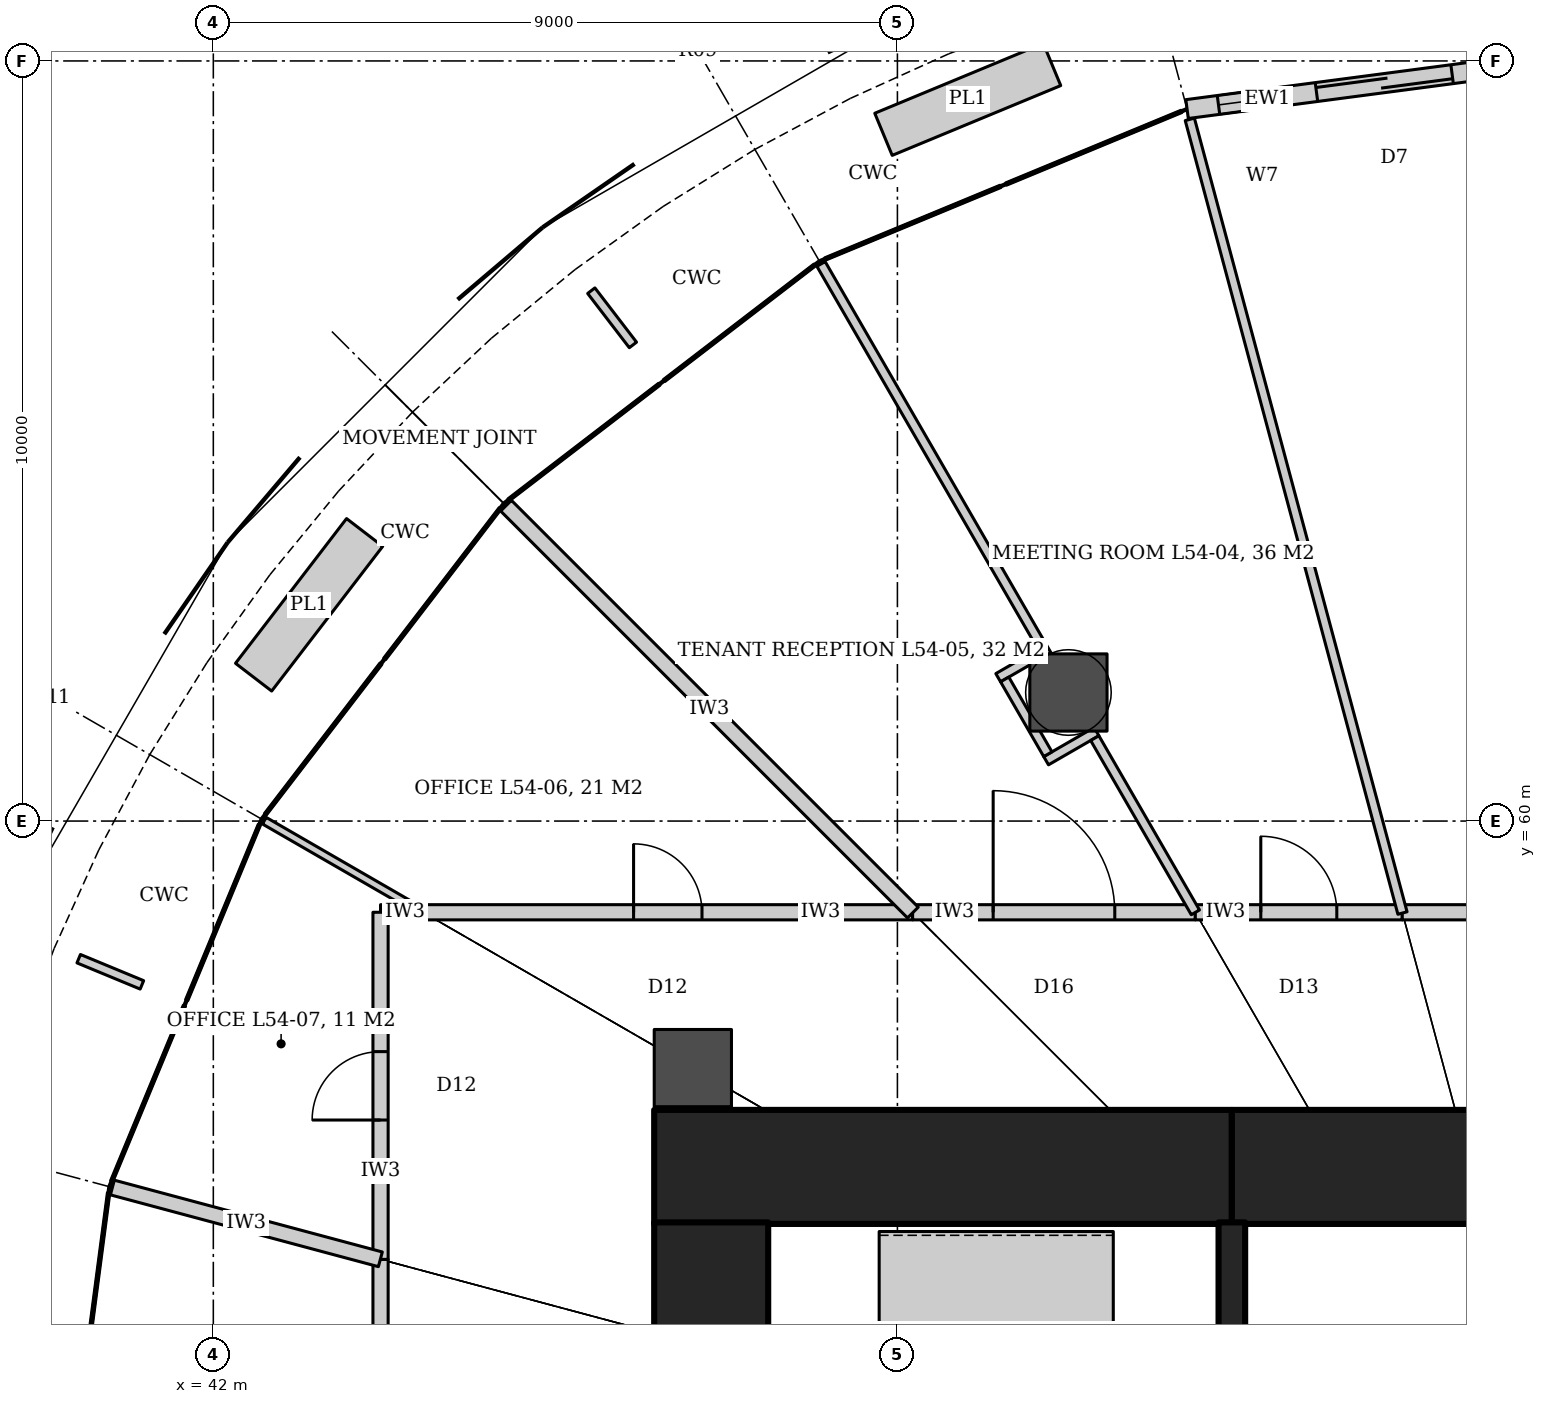
"""IFC4 building model, lengths in metres.
Left out: names, types, materials, properties, quantities, classifications, styles, units other than length and angle.
Written with IfcOpenShell. Run it as: python <this file> out.ifc"""

import sys

from ifc_helpers import new_model, si_unit, direction, frame, frame_2d, origin, origin_2d, place, context, subcontext, project, spatial, rectangle, hollow_circle, extrude, element, fill, save


model = new_model("IFC4")
c1 = context("Model", 3, precision=1e-05, world=origin(), true_north=direction((0.0, 1.0)))
c2 = subcontext(c1, "Body", "Model", "MODEL_VIEW")
j1 = project(units=[si_unit("LENGTHUNIT", "METRE"), si_unit("PLANEANGLEUNIT", "RADIAN")], contexts=[c1])
p1 = place(None, origin())
s1 = spatial("IfcSite", under=j1, at=p1, CompositionType="ELEMENT")
p2 = place(p1, origin())
s2 = spatial("IfcBuilding", under=s1, at=p2, CompositionType="ELEMENT")
p3 = place(p2, frame((0.0, 0.0, 227.6)))
s3 = spatial("IfcBuildingStorey", under=s2, at=p3, CompositionType="ELEMENT", Elevation=227.6)
p4 = place(p3, frame((47.8, 55.45, 0.0), z_axis=(0.0, 0.0, 1.0), x_axis=(1.0, 0.0, 0.0)))
e1 = element("IfcWall", 1, at=p4, inside=s3, PredefinedType="SHEAR", context=c2, shape_type="SweptSolid", body=[
    extrude(rectangle(XDim=7.6, YDim=1.5, at=frame_2d((3.8, 0.0))), origin(), (0.0, 0.0, 1.0), 4.2),
])
p5 = place(p3, frame((55.4, 55.45, 0.0), z_axis=(0.0, 0.0, 1.0), x_axis=(1.0, 0.0, 0.0)))
e2 = element("IfcWall", 2, at=p5, inside=s3, PredefinedType="SHEAR", context=c2, shape_type="SweptSolid", body=[
    extrude(rectangle(XDim=9.2, YDim=1.5, at=frame_2d((4.6, 0.0))), origin(), (0.0, 0.0, 1.0), 4.2),
])
p6 = place(p3, frame((48.55, 51.5, 0.0), z_axis=(0.0, 0.0, 1.0), x_axis=(0.0, 1.0, 0.0)))
e3 = element("IfcWall", 3, at=p6, inside=s3, PredefinedType="SHEAR", context=c2, shape_type="SweptSolid", body=[
    extrude(rectangle(XDim=3.22, YDim=1.5, at=frame_2d((1.61, 0.0))), origin(), (0.0, 0.0, 1.0), 4.2),
])
p7 = place(p3, frame((55.4, 51.655, 0.0), z_axis=(0.0, 0.0, 1.0), x_axis=(0.0, 1.0, 0.0)))
e4 = element("IfcWall", 4, at=p7, inside=s3, PredefinedType="SHEAR", context=c2, shape_type="SweptSolid", body=[
    extrude(rectangle(XDim=3.065, YDim=0.35, at=frame_2d((1.532, 0.0))), origin(), (0.0, 0.0, 1.0), 4.2),
])
for number, where, z_axis, x_axis in (
    (5, (53.25, 61.691, 0.0), (0.0, 0.0, 1.0), (1.0, 0.0, 0.0)),
    (6, (48.309, 56.75, 0.0), (0.0, 0.0, 1.0), (1.0, 0.0, 0.0)),
):
    element("IfcColumn", number, at=place(p3, frame(where, z_axis=z_axis, x_axis=x_axis)), inside=s3, PredefinedType="COLUMN", context=c2, shape_type="SweptSolid", body=[
        extrude(hollow_circle(Radius=0.508, WallThickness=0.05, at=origin_2d()), origin(), (0.0, 0.0, 1.0), 4.2),
    ])
p8 = place(p3, frame((44.2, 58.8, 0.0), z_axis=(0.0, 0.0, 1.0), x_axis=(1.0, 0.0, 0.0)))
e7 = element("IfcWall", 7, at=p8, inside=s3, PredefinedType="PARTITIONING", context=c2, shape_type="SweptSolid", body=[
    extrude(rectangle(XDim=0.558, YDim=0.2, at=frame_2d((0.279, 0.0))), origin(), (0.0, 0.0, 1.0), 3.02),
])
p9 = place(p3, frame((44.758, 58.8, 0.0), z_axis=(0.0, 0.0, 1.0), x_axis=(1.0, 0.0, 0.0)))
e8 = element("IfcWall", 8, at=p9, inside=s3, PredefinedType="PARTITIONING", context=c2, shape_type="SweptSolid", body=[
    extrude(rectangle(XDim=6.442, YDim=0.2, at=frame_2d((3.221, 0.0))), origin(), (0.0, 0.0, 1.0), 3.02),
])
p10 = place(p9, frame((2.771, 0.0, 0.0)))
e9 = element("IfcOpeningElement", 9, at=p10, cuts=e8, PredefinedType="OPENING", context=c2, shape_type="SweptSolid", body=[
    extrude(rectangle(XDim=0.9, YDim=2.4, at=frame_2d((0.45, 1.2))), frame((0.0, 0.11, 0.0), z_axis=(0.0, -1.0, 0.0), x_axis=(1.0, 0.0, 0.0)), (0.0, 0.0, 1.0), 0.22),
])
p11 = place(p3, frame((51.2, 58.8, 0.0), z_axis=(0.0, 0.0, 1.0), x_axis=(1.0, 0.0, 0.0)))
e10 = element("IfcWall", 10, at=p11, inside=s3, PredefinedType="PARTITIONING", context=c2, shape_type="SweptSolid", body=[
    extrude(rectangle(XDim=3.719, YDim=0.2, at=frame_2d((1.86, 0.0))), origin(), (0.0, 0.0, 1.0), 3.04),
])
p12 = place(p11, frame((1.06, 0.0, 0.0)))
e11 = element("IfcOpeningElement", 11, at=p12, cuts=e10, PredefinedType="OPENING", context=c2, shape_type="SweptSolid", body=[
    extrude(rectangle(XDim=1.6, YDim=2.4, at=frame_2d((0.8, 1.2))), frame((0.0, 0.11, 0.0), z_axis=(0.0, -1.0, 0.0), x_axis=(1.0, 0.0, 0.0)), (0.0, 0.0, 1.0), 0.22),
])
p13 = place(p3, frame((54.919, 58.8, 0.0), z_axis=(0.0, 0.0, 1.0), x_axis=(1.0, 0.0, 0.0)))
e12 = element("IfcWall", 12, at=p13, inside=s3, PredefinedType="PARTITIONING", context=c2, shape_type="SweptSolid", body=[
    extrude(rectangle(XDim=2.723, YDim=0.2, at=frame_2d((1.361, 0.0))), origin(), (0.0, 0.0, 1.0), 3.04),
])
p14 = place(p13, frame((0.861, 0.0, 0.0)))
e13 = element("IfcOpeningElement", 13, at=p14, cuts=e12, PredefinedType="OPENING", context=c2, shape_type="SweptSolid", body=[
    extrude(rectangle(XDim=1.0, YDim=2.4, at=frame_2d((0.5, 1.2))), frame((0.0, 0.11, 0.0), z_axis=(0.0, -1.0, 0.0), x_axis=(1.0, 0.0, 0.0)), (0.0, 0.0, 1.0), 0.22),
])
p15 = place(p3, frame((57.642, 58.8, 0.0), z_axis=(0.0, 0.0, 1.0), x_axis=(1.0, 0.0, 0.0)))
e14 = element("IfcWall", 14, at=p15, inside=s3, PredefinedType="PARTITIONING", context=c2, shape_type="SweptSolid", body=[
    extrude(rectangle(XDim=18.158, YDim=0.2, at=frame_2d((9.079, 0.0))), origin(), (0.0, 0.0, 1.0), 3.02),
])
p16 = place(p15, frame((8.079, 0.0, 0.0)))
e15 = element("IfcOpeningElement", 15, at=p16, cuts=e14, PredefinedType="OPENING", context=c2, shape_type="SweptSolid", body=[
    extrude(rectangle(XDim=2.0, YDim=2.1, at=frame_2d((1.0, 1.05))), frame((0.0, 0.11, 0.0), z_axis=(0.0, -1.0, 0.0), x_axis=(1.0, 0.0, 0.0)), (0.0, 0.0, 1.0), 0.22),
])
p17 = place(p3, frame((44.2, 40.878, 0.0), z_axis=(0.0, 0.0, 1.0), x_axis=(0.0, 1.0, 0.0)))
e16 = element("IfcWall", 16, at=p17, inside=s3, PredefinedType="PARTITIONING", context=c2, shape_type="SweptSolid", body=[
    extrude(rectangle(XDim=13.356, YDim=0.2, at=frame_2d((6.678, 0.0))), origin(), (0.0, 0.0, 1.0), 3.02),
])
p18 = place(p17, frame((5.678, 0.0, 0.0)))
e17 = element("IfcOpeningElement", 17, at=p18, cuts=e16, PredefinedType="OPENING", context=c2, shape_type="SweptSolid", body=[
    extrude(rectangle(XDim=2.0, YDim=2.1, at=frame_2d((1.0, 1.05))), frame((0.0, 0.11, 0.0), z_axis=(0.0, -1.0, 0.0), x_axis=(1.0, 0.0, 0.0)), (0.0, 0.0, 1.0), 0.22),
])
p19 = place(p3, frame((44.2, 54.234, 0.0), z_axis=(0.0, 0.0, 1.0), x_axis=(0.0, 1.0, 0.0)))
e18 = element("IfcWall", 18, at=p19, inside=s3, PredefinedType="PARTITIONING", context=c2, shape_type="SweptSolid", body=[
    extrude(rectangle(XDim=4.566, YDim=0.2, at=frame_2d((2.283, 0.0))), origin(), (0.0, 0.0, 1.0), 3.02),
])
p20 = place(p19, frame((1.833, 0.0, 0.0)))
e19 = element("IfcOpeningElement", 19, at=p20, cuts=e18, PredefinedType="OPENING", context=c2, shape_type="SweptSolid", body=[
    extrude(rectangle(XDim=0.9, YDim=2.4, at=frame_2d((0.45, 1.2))), frame((0.0, 0.11, 0.0), z_axis=(0.0, -1.0, 0.0), x_axis=(1.0, 0.0, 0.0)), (0.0, 0.0, 1.0), 0.22),
])
p21 = place(p3, frame((57.645, 58.79, 0.0), z_axis=(0.0, 0.0, 1.0), x_axis=(-0.258819612444, 0.96592567427, 0.0)))
e20 = element("IfcWall", 20, at=p21, inside=s3, PredefinedType="PARTITIONING", context=c2, shape_type="SweptSolid", body=[
    extrude(rectangle(XDim=10.86, YDim=0.125, at=frame_2d((5.43, 0.0))), origin(), (0.0, 0.0, 1.0), 3.02),
])
for number, where, z_axis, x_axis in (
    (21, (53.511, 61.114, 0.0), (0.0, 0.0, 1.0), (0.866, 0.5, 0.0)),
    (22, (52.881, 62.206, 0.0), (0.0, 0.0, 1.0), (0.866, 0.5, 0.0)),
):
    element("IfcWall", number, at=place(p3, frame(where, z_axis=z_axis, x_axis=x_axis)), inside=s3, PredefinedType="PARTITIONING", context=c2, shape_type="SweptSolid", body=[
        extrude(rectangle(XDim=0.766, YDim=0.125, at=frame_2d((0.383, 0.0))), origin(), (0.0, 0.0, 1.0), 3.02),
    ])
p22 = place(p3, frame((54.089, 61.52, 0.0), z_axis=(0.0, 0.0, 1.0), x_axis=(-0.499976747263, 0.866038828342, 0.0)))
e23 = element("IfcWall", 23, at=p22, inside=s3, PredefinedType="PARTITIONING", context=c2, shape_type="SweptSolid", body=[
    extrude(rectangle(XDim=1.136, YDim=0.125, at=frame_2d((0.568, 0.0))), origin(), (0.0, 0.0, 1.0), 3.02),
])
p23 = place(p3, frame((54.92, 58.799, 0.0), z_axis=(0.0, 0.0, 1.0), x_axis=(-0.499977931934, 0.866038144413, 0.0)))
e24 = element("IfcWall", 24, at=p23, inside=s3, PredefinedType="PARTITIONING", context=c2, shape_type="SweptSolid", body=[
    extrude(rectangle(XDim=2.647, YDim=0.125, at=frame_2d((1.323, 0.0))), origin(), (0.0, 0.0, 1.0), 3.04),
])
p24 = place(p3, frame((52.904, 62.292, 0.0), z_axis=(0.0, 0.0, 1.0), x_axis=(-0.500005810984, 0.866022048785, 0.0)))
e25 = element("IfcWall", 25, at=p24, inside=s3, PredefinedType="PARTITIONING", context=c2, shape_type="SweptSolid", body=[
    extrude(rectangle(XDim=5.867, YDim=0.125, at=frame_2d((2.934, 0.0))), origin(), (0.0, 0.0, 1.0), 3.02),
])
p25 = place(p3, frame((51.204, 58.796, 0.0), z_axis=(0.0, 0.0, 1.0), x_axis=(-0.707106781187, 0.707106781187, 0.0)))
e26 = element("IfcWall", 26, at=p25, inside=s3, PredefinedType="PARTITIONING", context=c2, shape_type="SweptSolid", body=[
    extrude(rectangle(XDim=7.62, YDim=0.2, at=frame_2d((3.81, 0.0))), origin(), (0.0, 0.0, 1.0), 3.02),
])
p26 = place(p3, frame((44.758, 58.8, 0.0), z_axis=(0.0, 0.0, 1.0), x_axis=(-0.86604842682, 0.499960120811, 0.0)))
e27 = element("IfcWall", 27, at=p26, inside=s3, PredefinedType="PARTITIONING", context=c2, shape_type="SweptSolid", body=[
    extrude(rectangle(XDim=2.46, YDim=0.1, at=frame_2d((1.23, 0.0))), origin(), (0.0, 0.0, 1.0), 3.02),
])
p27 = place(p3, frame((44.198, 54.234, 0.0), z_axis=(0.0, 0.0, 1.0), x_axis=(-0.965934209463, 0.258787756644, 0.0)))
e28 = element("IfcWall", 28, at=p27, inside=s3, PredefinedType="PARTITIONING", context=c2, shape_type="SweptSolid", body=[
    extrude(rectangle(XDim=3.7, YDim=0.2, at=frame_2d((1.85, 0.0))), origin(), (0.0, 0.0, 1.0), 3.02),
])
p28 = place(p3, frame((60.0, 70.1, 0.0), z_axis=(0.0, 0.0, 1.0), x_axis=(-0.991440353351, -0.130560429487, 0.0)))
e29 = element("IfcWall", 29, at=p28, inside=s3, PredefinedType="SOLIDWALL", context=c2, shape_type="SweptSolid", body=[
    extrude(rectangle(XDim=5.247, YDim=0.25, at=frame_2d((2.624, 0.0))), origin(), (0.0, 0.0, 1.0), 4.04),
])
p29 = place(p28, frame((1.724, 0.0, 0.0)))
e30 = element("IfcOpeningElement", 30, at=p29, cuts=e29, PredefinedType="OPENING", context=c2, shape_type="SweptSolid", body=[
    extrude(rectangle(XDim=1.8, YDim=2.4, at=frame_2d((0.9, 1.2))), frame((0.0, 0.135, 0.0), z_axis=(0.0, -1.0, 0.0), x_axis=(1.0, 0.0, 0.0)), (0.0, 0.0, 1.0), 0.27),
])
p30 = place(p28, frame((0.424, 0.0, 0.0)))
e31 = element("IfcOpeningElement", 31, at=p30, cuts=e29, PredefinedType="OPENING", context=c2, shape_type="SweptSolid", body=[
    extrude(rectangle(XDim=0.9, YDim=2.4, at=frame_2d((0.45, 1.2))), frame((0.0, 0.135, 0.0), z_axis=(0.0, -1.0, 0.0), x_axis=(1.0, 0.0, 0.0)), (0.0, 0.0, 1.0), 0.27),
])
p31 = place(p28, frame((3.924, 0.0, 0.0)))
e32 = element("IfcOpeningElement", 32, at=p31, cuts=e29, PredefinedType="OPENING", context=c2, shape_type="SweptSolid", body=[
    extrude(rectangle(XDim=0.9, YDim=2.4, at=frame_2d((0.45, 1.2))), frame((0.0, 0.135, 0.0), z_axis=(0.0, -1.0, 0.0), x_axis=(1.0, 0.0, 0.0)), (0.0, 0.0, 1.0), 0.27),
])
p32 = place(p14, origin())
e33 = element("IfcDoor", 33, at=p32, inside=s3, OperationType="SINGLE_SWING_LEFT", PredefinedType="DOOR", context=c2, shape_type="SweptSolid", body=[
    extrude(rectangle(XDim=1.0, YDim=2.4, at=frame_2d((0.5, 1.2))), frame((0.0, 0.025, 0.0), z_axis=(0.0, -1.0, 0.0), x_axis=(1.0, 0.0, 0.0)), (0.0, 0.0, 1.0), 0.05),
])
fill(e13, e33)
p33 = place(p12, origin())
e34 = element("IfcDoor", 34, at=p33, inside=s3, OperationType="DOUBLE_DOOR_DOUBLE_SWING", PredefinedType="DOOR", context=c2, shape_type="SweptSolid", body=[
    extrude(rectangle(XDim=1.6, YDim=2.4, at=frame_2d((0.8, 1.2))), frame((0.0, 0.025, 0.0), z_axis=(0.0, -1.0, 0.0), x_axis=(1.0, 0.0, 0.0)), (0.0, 0.0, 1.0), 0.05),
])
fill(e11, e34)
p34 = place(p10, origin())
e35 = element("IfcDoor", 35, at=p34, inside=s3, OperationType="SINGLE_SWING_LEFT", PredefinedType="DOOR", context=c2, shape_type="SweptSolid", body=[
    extrude(rectangle(XDim=0.9, YDim=2.4, at=frame_2d((0.45, 1.2))), frame((0.0, 0.025, 0.0), z_axis=(0.0, -1.0, 0.0), x_axis=(1.0, 0.0, 0.0)), (0.0, 0.0, 1.0), 0.05),
])
fill(e9, e35)
p35 = place(p20, origin())
e36 = element("IfcDoor", 36, at=p35, inside=s3, OperationType="SINGLE_SWING_LEFT", PredefinedType="DOOR", context=c2, shape_type="SweptSolid", body=[
    extrude(rectangle(XDim=0.9, YDim=2.4, at=frame_2d((0.45, 1.2))), frame((0.0, 0.025, 0.0), z_axis=(0.0, -1.0, 0.0), x_axis=(1.0, 0.0, 0.0)), (0.0, 0.0, 1.0), 0.05),
])
fill(e19, e36)
p36 = place(p29, origin())
e37 = element("IfcDoor", 37, at=p36, inside=s3, OperationType="DOUBLE_DOOR_SLIDING", PredefinedType="DOOR", context=c2, shape_type="SweptSolid", body=[
    extrude(rectangle(XDim=1.8, YDim=2.4, at=frame_2d((0.9, 1.2))), frame((0.0, 0.025, 0.0), z_axis=(0.0, -1.0, 0.0), x_axis=(1.0, 0.0, 0.0)), (0.0, 0.0, 1.0), 0.05),
])
fill(e30, e37)
p37 = place(p31, origin())
e38 = element("IfcWindow", 38, at=p37, inside=s3, PartitioningType="SINGLE_PANEL", PredefinedType="WINDOW", context=c2, shape_type="SweptSolid", body=[
    extrude(rectangle(XDim=0.9, YDim=2.4, at=frame_2d((0.45, 1.2))), frame((0.0, 0.03, 0.0), z_axis=(0.0, -1.0, 0.0), x_axis=(1.0, 0.0, 0.0)), (0.0, 0.0, 1.0), 0.06),
])
fill(e32, e38)
save(model, sys.argv[1])
